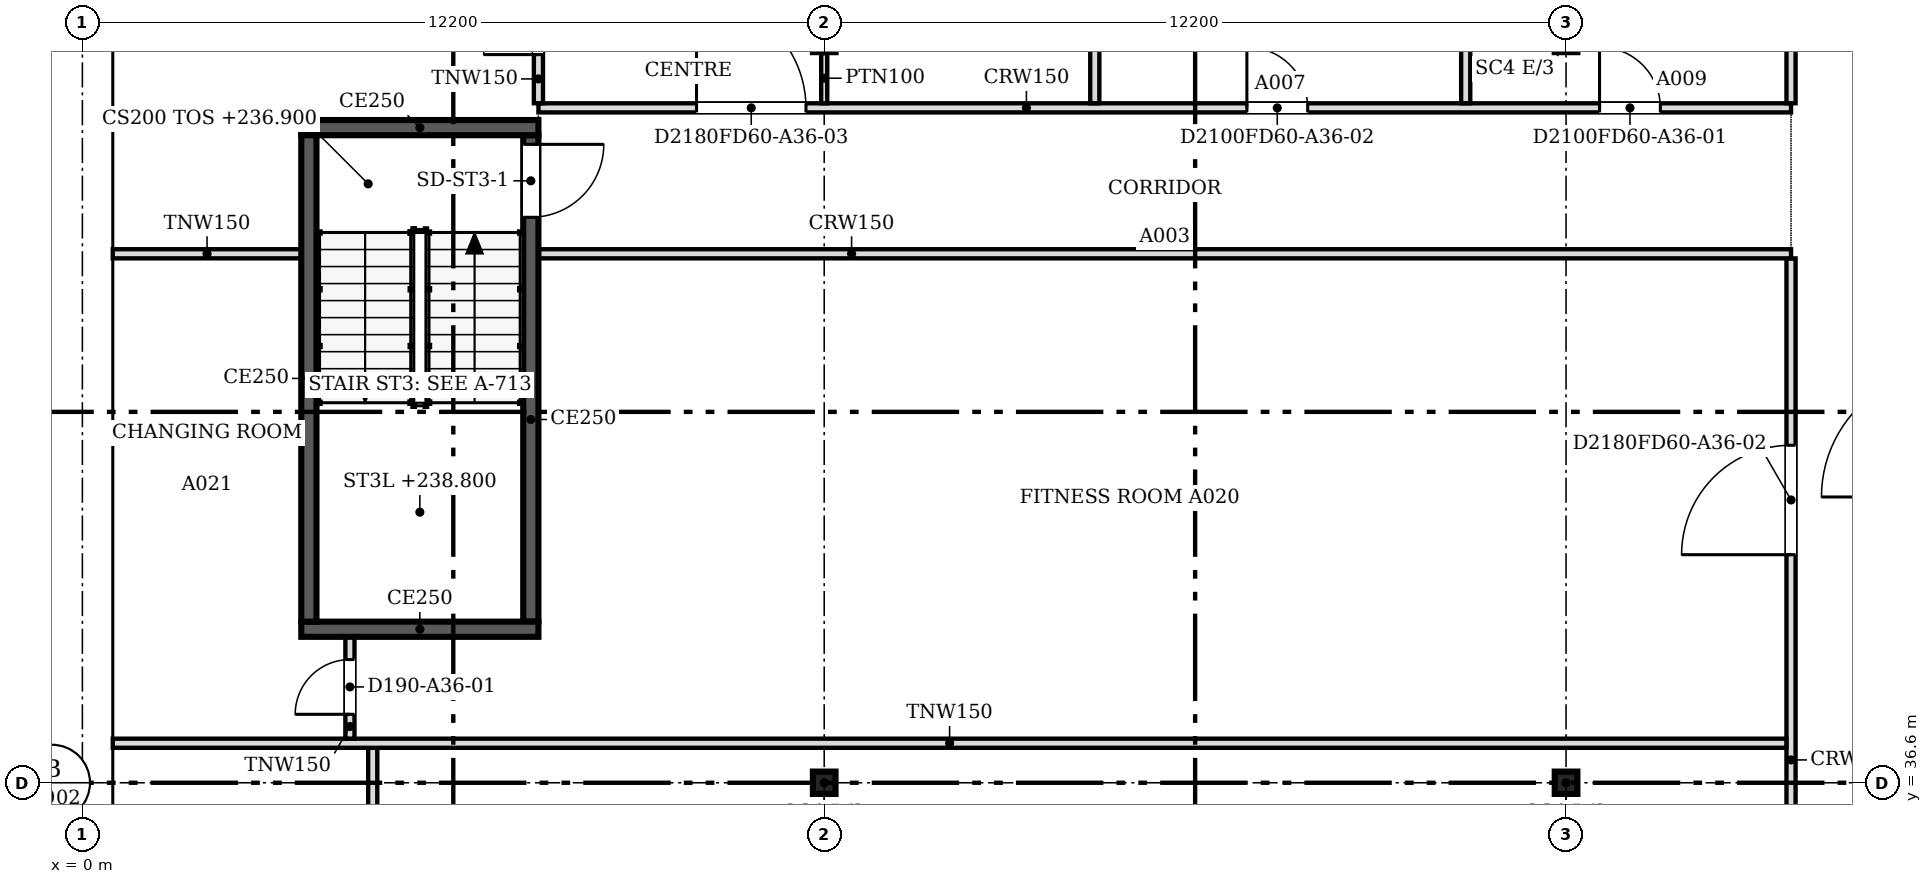
"""IFC4 building model, lengths in metres.
Left out: names, types, materials, properties, quantities, classifications, styles, units other than length and angle.
Written with IfcOpenShell. Run it as: python <this file> out.ifc"""

import sys

from ifc_helpers import new_model, si_unit, direction, frame, frame_2d, origin, origin_2d, place, context, subcontext, project, spatial, polyline, rectangle, i_section, outline, extrude, faceted_brep, source, transform, mapped, element, fill, save


model = new_model("IFC4")
c1 = context("Model", 3, precision=1e-05, world=origin(), true_north=direction((0.0, 1.0)))
c2 = subcontext(c1, "Body", "Model", "MODEL_VIEW")
j1 = project(units=[si_unit("LENGTHUNIT", "METRE"), si_unit("PLANEANGLEUNIT", "RADIAN")], contexts=[c1])
p1 = place(None, origin())
s1 = spatial("IfcSite", under=j1, at=p1, CompositionType="ELEMENT")
p2 = place(p1, origin())
s2 = spatial("IfcBuilding", under=s1, at=p2, CompositionType="ELEMENT")
p3 = place(p2, frame((0.0, 0.0, 236.9)))
s3 = spatial("IfcBuildingStorey", under=s2, at=p3, CompositionType="ELEMENT", Elevation=236.9)
for number, where, z_axis, x_axis in (
    (1, (12.2, 36.6, 0.0), (0.0, 0.0, 1.0), (1.0, 0.0, 0.0)),
    (2, (12.2, 48.8, 0.0), (0.0, 0.0, 1.0), (1.0, 0.0, 0.0)),
    (3, (24.4, 36.6, 0.0), (0.0, 0.0, 1.0), (1.0, 0.0, 0.0)),
    (4, (24.4, 48.8, 0.0), (0.0, 0.0, 1.0), (1.0, 0.0, 0.0)),
):
    element("IfcColumn", number, at=place(p3, frame(where, z_axis=z_axis, x_axis=x_axis)), inside=s3, PredefinedType="COLUMN", context=c2, shape_type="SweptSolid", body=[
        extrude(i_section(OverallWidth=0.373, OverallDepth=0.368, WebThickness=0.015, FlangeThickness=0.024, at=origin_2d()), origin(), (0.0, 0.0, 1.0), 3.6),
    ])
m1 = source(origin(), c2, "Body", "Brep", [
    faceted_brep([(6.053, -0.25, 0.0), (3.003, -0.25, 3.8), (0.0, -0.25, 0.0), (0.047, 0.25, 0.059), (3.003, 0.25, 3.8), (6.053, 0.25, 0.0), (0.047, 0.25, 0.0), (0.0, 0.0, 0.0)], [[[0, 1, 2]], [[3, 4, 5, 6]], [[5, 4, 1, 0]], [[4, 3, 7, 2, 1]], [[6, 5, 0, 2, 7]], [[6, 7, 3]]]),
])
p4 = place(p3, frame((0.25, 48.753, 0.0), z_axis=(0.0, 0.0, 1.0), x_axis=(0.0, -1.0, 0.0)))
e5 = element("IfcWall", 5, at=p4, inside=s3, PredefinedType="SOLIDWALL", context=c2, shape_type="MappedRepresentation", body=[
    mapped(m1, transform((0.0, 0.0, 0.0), scale=1.0)),
])
m2 = source(origin(), c2, "Body", "SweptSolid", [
    extrude(outline(polyline([(5.532, 0.25), (3.005, 3.399), (0.516, 0.25), (5.532, 0.25)])), frame((0.0, 0.26, 0.0), z_axis=(0.0, -1.0, 0.0), x_axis=(1.0, 0.0, 0.0)), (0.0, 0.0, 1.0), 0.52),
])
p5 = place(p4, origin())
e6 = element("IfcOpeningElement", 6, at=p5, cuts=e5, PredefinedType="OPENING", context=c2, shape_type="MappedRepresentation", body=[
    mapped(m2, transform((0.0, 0.0, 0.0), scale=1.0)),
])
m3 = source(origin(), c2, "Body", "Brep", [
    faceted_brep([(6.1, -0.25, 0.0), (3.05, -0.25, 3.8), (0.0, -0.25, 0.0), (6.1, -0.25, 0.0), (0.0, 0.25, 0.0), (3.05, 0.25, 3.8), (6.1, 0.25, 0.0), (6.1, 0.25, 0.0)], [[[0, 1, 2, 3]], [[4, 5, 6, 7]], [[6, 5, 1, 0]], [[5, 4, 2, 1]], [[4, 7, 3, 2]], [[3, 7, 6, 0]]]),
])
p6 = place(p3, frame((0.25, 42.7, 0.0), z_axis=(0.0, 0.0, 1.0), x_axis=(0.0, -1.0, 0.0)))
e7 = element("IfcWall", 7, at=p6, inside=s3, PredefinedType="SOLIDWALL", context=c2, shape_type="MappedRepresentation", body=[
    mapped(m3, transform((0.0, 0.0, 0.0), scale=1.0)),
])
m4 = source(origin(), c2, "Body", "SweptSolid", [
    extrude(outline(polyline([(5.579, 0.25), (3.05, 3.401), (0.521, 0.25), (5.579, 0.25)])), frame((0.0, 0.26, 0.0), z_axis=(0.0, -1.0, 0.0), x_axis=(1.0, 0.0, 0.0)), (0.0, 0.0, 1.0), 0.52),
])
p7 = place(p6, origin())
e8 = element("IfcOpeningElement", 8, at=p7, cuts=e7, PredefinedType="OPENING", context=c2, shape_type="MappedRepresentation", body=[
    mapped(m4, transform((0.0, 0.0, 0.0), scale=1.0)),
])
m5 = source(origin(), c2, "Body", "SweptSolid", [
    extrude(outline(polyline([(6.1, 0.0), (3.05, 3.8), (0.0, 0.0), (6.1, 0.0)])), frame((0.0, 0.25, 0.0), z_axis=(0.0, -1.0, 0.0), x_axis=(1.0, 0.0, 0.0)), (0.0, 0.0, 1.0), 0.5),
])
p8 = place(p3, frame((0.25, 36.6, 0.0), z_axis=(0.0, 0.0, 1.0), x_axis=(0.0, -1.0, 0.0)))
e9 = element("IfcWall", 9, at=p8, inside=s3, PredefinedType="SOLIDWALL", context=c2, shape_type="MappedRepresentation", body=[
    mapped(m5, transform((0.0, 0.0, 0.0), scale=1.0)),
])
p9 = place(p8, origin())
e10 = element("IfcOpeningElement", 10, at=p9, cuts=e9, PredefinedType="OPENING", context=c2, shape_type="MappedRepresentation", body=[
    mapped(m4, transform((0.0, 0.0, 0.0), scale=1.0)),
])
p10 = place(p2, frame((0.0, 0.0, 240.7)))
s4 = spatial("IfcBuildingStorey", under=s2, at=p10, CompositionType="ELEMENT", Elevation=240.7)
m6 = source(origin(), c2, "Body", "Brep", [
    faceted_brep([(0.047, -0.25, 0.0), (3.05, -0.25, 3.8), (0.047, -0.25, 7.6), (0.0, -0.25, 7.54), (0.0, -0.25, 0.06), (0.093, 0.25, 7.541), (3.05, 0.25, 3.8), (0.093, 0.25, 0.059), (0.047, 0.0, 0.0), (0.047, 0.0, 7.6)], [[[0, 1, 2, 3, 4]], [[5, 6, 7]], [[7, 6, 1, 0, 8]], [[6, 5, 9, 2, 1]], [[3, 2, 9]], [[8, 0, 4]], [[7, 8, 4, 3, 9, 5]]]),
])
p11 = place(p10, frame((0.25, 48.8, -3.8), z_axis=(0.0, 0.0, 1.0), x_axis=(0.0, -1.0, 0.0)))
e11 = element("IfcWall", 11, at=p11, inside=s4, PredefinedType="SOLIDWALL", context=c2, shape_type="MappedRepresentation", body=[
    mapped(m6, transform((0.0, 0.0, 0.0), scale=1.0)),
])
m7 = source(origin(), c2, "Body", "SweptSolid", [
    extrude(outline(polyline([(0.247, 0.656), (2.731, 3.8), (0.247, 6.944), (0.247, 0.656)])), frame((0.0, 0.26, 0.0), z_axis=(0.0, -1.0, 0.0), x_axis=(1.0, 0.0, 0.0)), (0.0, 0.0, 1.0), 0.52),
])
p12 = place(p11, origin())
e12 = element("IfcOpeningElement", 12, at=p12, cuts=e11, PredefinedType="OPENING", context=c2, shape_type="MappedRepresentation", body=[
    mapped(m7, transform((0.0, 0.0, 0.0), scale=1.0)),
])
m8 = source(origin(), c2, "Body", "SweptSolid", [
    extrude(outline(polyline([(3.05, 0.0), (6.1, 3.8), (3.05, 7.6), (0.0, 3.8), (3.05, 0.0)])), frame((0.0, 0.25, 0.0), z_axis=(0.0, -1.0, 0.0), x_axis=(1.0, 0.0, 0.0)), (0.0, 0.0, 1.0), 0.5),
])
p13 = place(p10, frame((0.25, 45.75, -3.8), z_axis=(0.0, 0.0, 1.0), x_axis=(0.0, -1.0, 0.0)))
e13 = element("IfcWall", 13, at=p13, inside=s4, PredefinedType="SOLIDWALL", context=c2, shape_type="MappedRepresentation", body=[
    mapped(m8, transform((0.0, 0.0, 0.0), scale=1.0)),
])
m9 = source(origin(), c2, "Body", "SweptSolid", [
    extrude(outline(polyline([(3.05, 0.399), (5.78, 3.8), (3.05, 7.201), (0.321, 3.8), (3.05, 0.399)])), frame((0.0, 0.26, 0.0), z_axis=(0.0, -1.0, 0.0), x_axis=(1.0, 0.0, 0.0)), (0.0, 0.0, 1.0), 0.52),
])
p14 = place(p13, origin())
e14 = element("IfcOpeningElement", 14, at=p14, cuts=e13, PredefinedType="OPENING", context=c2, shape_type="MappedRepresentation", body=[
    mapped(m9, transform((0.0, 0.0, 0.0), scale=1.0)),
])
m10 = source(origin(), c2, "Body", "Brep", [
    faceted_brep([(3.05, -0.25, 0.0), (6.1, -0.25, 3.8), (6.1, -0.25, 3.8), (3.05, -0.25, 7.6), (0.0, -0.25, 3.8), (0.0, 0.25, 3.8), (3.05, 0.25, 7.6), (6.1, 0.25, 3.8), (6.1, 0.25, 3.8), (3.05, 0.25, 0.0)], [[[0, 1, 2, 3, 4]], [[5, 6, 7, 8, 9]], [[9, 8, 1, 0]], [[7, 6, 3, 2]], [[6, 5, 4, 3]], [[5, 9, 0, 4]], [[1, 8, 7, 2]]]),
])
p15 = place(p10, frame((0.25, 39.65, -3.8), z_axis=(0.0, 0.0, 1.0), x_axis=(0.0, -1.0, 0.0)))
e15 = element("IfcWall", 15, at=p15, inside=s4, PredefinedType="SOLIDWALL", context=c2, shape_type="MappedRepresentation", body=[
    mapped(m10, transform((0.0, 0.0, 0.0), scale=1.0)),
])
p16 = place(p15, origin())
e16 = element("IfcOpeningElement", 16, at=p16, cuts=e15, PredefinedType="OPENING", context=c2, shape_type="MappedRepresentation", body=[
    mapped(m9, transform((0.0, 0.0, 0.0), scale=1.0)),
])
p17 = place(p3, frame((7.5, 39.125, 0.0), z_axis=(0.0, 0.0, 1.0), x_axis=(-1.0, 0.0, 0.0)))
e17 = element("IfcWall", 17, at=p17, inside=s3, PredefinedType="SOLIDWALL", context=c2, shape_type="SweptSolid", body=[
    extrude(rectangle(XDim=3.9, YDim=0.25, at=frame_2d((1.95, 0.0))), origin(), (0.0, 0.0, 1.0), 3.8),
])
p18 = place(p3, frame((3.725, 39.25, 0.0), z_axis=(0.0, 0.0, 1.0), x_axis=(0.0, 1.0, 0.0)))
e18 = element("IfcWall", 18, at=p18, inside=s3, PredefinedType="SOLIDWALL", context=c2, shape_type="SweptSolid", body=[
    extrude(rectangle(XDim=8.0, YDim=0.25, at=frame_2d((4.0, 0.0))), origin(), (0.0, 0.0, 1.0), 3.8),
])
p19 = place(p3, frame((3.6, 47.375, 0.0), z_axis=(0.0, 0.0, 1.0), x_axis=(1.0, 0.0, 0.0)))
e19 = element("IfcWall", 19, at=p19, inside=s3, PredefinedType="SOLIDWALL", context=c2, shape_type="SweptSolid", body=[
    extrude(rectangle(XDim=3.9, YDim=0.25, at=frame_2d((1.95, 0.0))), origin(), (0.0, 0.0, 1.0), 3.8),
])
p20 = place(p3, frame((7.375, 47.25, 0.0), z_axis=(0.0, 0.0, 1.0), x_axis=(0.0, -1.0, 0.0)))
e20 = element("IfcWall", 20, at=p20, inside=s3, PredefinedType="SOLIDWALL", context=c2, shape_type="SweptSolid", body=[
    extrude(rectangle(XDim=8.0, YDim=0.25, at=frame_2d((4.0, 0.0))), origin(), (0.0, 0.0, 1.0), 3.8),
])
m11 = source(origin(), c2, "Body", "SweptSolid", [
    extrude(rectangle(XDim=1.2, YDim=2.1, at=frame_2d((0.6, 1.05))), frame((0.0, 0.135, 0.0), z_axis=(0.0, -1.0, 0.0), x_axis=(1.0, 0.0, 0.0)), (0.0, 0.0, 1.0), 0.27),
])
p21 = place(p20, frame((0.15, 0.0, 0.0)))
e21 = element("IfcOpeningElement", 21, at=p21, cuts=e20, PredefinedType="OPENING", context=c2, shape_type="MappedRepresentation", body=[
    mapped(m11, transform((0.0, 0.0, 0.0), scale=1.0)),
])
p22 = place(p3, frame((28.1, 22.076, 0.0), z_axis=(0.0, 0.0, 1.0), x_axis=(0.0, 1.0, 0.0)))
e22 = element("IfcWall", 22, at=p22, inside=s3, PredefinedType="PARTITIONING", context=c2, shape_type="SweptSolid", body=[
    extrude(rectangle(XDim=23.148, YDim=0.15, at=frame_2d((11.574, 0.0))), origin(), (0.0, 0.0, 1.0), 3.067),
])
m12 = source(origin(), c2, "Body", "SweptSolid", [
    extrude(rectangle(XDim=1.8, YDim=2.1, at=frame_2d((0.9, 1.05))), frame((0.0, 0.085, 0.0), z_axis=(0.0, -1.0, 0.0), x_axis=(1.0, 0.0, 0.0)), (0.0, 0.0, 1.0), 0.17),
])
p23 = place(p22, frame((2.1, 0.0, 0.0)))
e23 = element("IfcOpeningElement", 23, at=p23, cuts=e22, PredefinedType="OPENING", context=c2, shape_type="MappedRepresentation", body=[
    mapped(m12, transform((0.0, 0.0, 0.0), scale=1.0)),
])
p24 = place(p22, frame((18.275, 0.0, 0.0)))
e24 = element("IfcOpeningElement", 24, at=p24, cuts=e22, PredefinedType="OPENING", context=c2, shape_type="MappedRepresentation", body=[
    mapped(m12, transform((0.0, 0.0, 0.0), scale=1.0)),
])
p25 = place(p22, frame((9.724, 0.0, 0.0)))
e25 = element("IfcOpeningElement", 25, at=p25, cuts=e22, PredefinedType="OPENING", context=c2, shape_type="MappedRepresentation", body=[
    mapped(m12, transform((0.0, 0.0, 0.0), scale=1.0)),
])
p26 = place(p3, frame((4.775, 28.1, 0.0), z_axis=(0.0, 0.0, 1.0), x_axis=(0.0, 1.0, 0.0)))
e26 = element("IfcWall", 26, at=p26, inside=s3, PredefinedType="PARTITIONING", context=c2, shape_type="SweptSolid", body=[
    extrude(rectangle(XDim=9.074, YDim=0.15, at=frame_2d((4.537, 0.0))), origin(), (0.0, 0.0, 1.0), 3.067),
])
m13 = source(origin(), c2, "Body", "SweptSolid", [
    extrude(rectangle(XDim=0.9, YDim=2.1, at=frame_2d((0.45, 1.05))), frame((0.0, 0.085, 0.0), z_axis=(0.0, -1.0, 0.0), x_axis=(1.0, 0.0, 0.0)), (0.0, 0.0, 1.0), 0.17),
])
p27 = place(p26, frame((1.8, 0.0, 0.0)))
e27 = element("IfcOpeningElement", 27, at=p27, cuts=e26, PredefinedType="OPENING", context=c2, shape_type="MappedRepresentation", body=[
    mapped(m13, transform((0.0, 0.0, 0.0), scale=1.0)),
])
p28 = place(p26, frame((6.32, 0.0, 0.0)))
e28 = element("IfcOpeningElement", 28, at=p28, cuts=e26, PredefinedType="OPENING", context=c2, shape_type="MappedRepresentation", body=[
    mapped(m13, transform((0.0, 0.0, 0.0), scale=1.0)),
])
p29 = place(p3, frame((0.5, 37.25, 0.0), z_axis=(0.0, 0.0, 1.0), x_axis=(1.0, 0.0, 0.0)))
e29 = element("IfcWall", 29, at=p29, inside=s3, PredefinedType="PARTITIONING", context=c2, shape_type="SweptSolid", body=[
    extrude(rectangle(XDim=27.524, YDim=0.15, at=frame_2d((13.762, 0.0))), origin(), (0.0, 0.0, 1.0), 3.067),
])
p30 = place(p3, frame((4.4, 37.326, 0.0), z_axis=(0.0, 0.0, 1.0), x_axis=(0.0, 1.0, 0.0)))
e30 = element("IfcWall", 30, at=p30, inside=s3, PredefinedType="PARTITIONING", context=c2, shape_type="SweptSolid", body=[
    extrude(rectangle(XDim=1.674, YDim=0.15, at=frame_2d((0.837, 0.0))), origin(), (0.0, 0.0, 1.0), 3.067),
])
p31 = place(p30, frame((0.4, 0.0, 0.0)))
e31 = element("IfcOpeningElement", 31, at=p31, cuts=e30, PredefinedType="OPENING", context=c2, shape_type="MappedRepresentation", body=[
    mapped(m13, transform((0.0, 0.0, 0.0), scale=1.0)),
])
p32 = place(p3, frame((0.5, 45.3, 0.0), z_axis=(0.0, 0.0, 1.0), x_axis=(1.0, 0.0, 0.0)))
e32 = element("IfcWall", 32, at=p32, inside=s3, PredefinedType="PARTITIONING", context=c2, shape_type="SweptSolid", body=[
    extrude(rectangle(XDim=3.1, YDim=0.15, at=frame_2d((1.55, 0.0))), origin(), (0.0, 0.0, 1.0), 3.067),
])
p33 = place(p3, frame((7.5, 45.3, 0.0), z_axis=(0.0, 0.0, 1.0), x_axis=(1.0, 0.0, 0.0)))
e33 = element("IfcWall", 33, at=p33, inside=s3, PredefinedType="PARTITIONING", context=c2, shape_type="SweptSolid", body=[
    extrude(rectangle(XDim=20.6, YDim=0.15, at=frame_2d((10.3, 0.0))), origin(), (0.0, 0.0, 1.0), 3.067),
])
p34 = place(p3, frame((7.5, 47.7, 0.0), z_axis=(0.0, 0.0, 1.0), x_axis=(1.0, 0.0, 0.0)))
e34 = element("IfcWall", 34, at=p34, inside=s3, PredefinedType="PARTITIONING", context=c2, shape_type="SweptSolid", body=[
    extrude(rectangle(XDim=20.6, YDim=0.15, at=frame_2d((10.3, 0.0))), origin(), (0.0, 0.0, 1.0), 3.067),
])
m14 = source(origin(), c2, "Body", "SweptSolid", [
    extrude(rectangle(XDim=1.0, YDim=2.1, at=frame_2d((0.5, 1.05))), frame((0.0, 0.085, 0.0), z_axis=(0.0, -1.0, 0.0), x_axis=(1.0, 0.0, 0.0)), (0.0, 0.0, 1.0), 0.17),
])
p35 = place(p34, frame((17.451, 0.0, 0.0)))
e35 = element("IfcOpeningElement", 35, at=p35, cuts=e34, PredefinedType="OPENING", context=c2, shape_type="MappedRepresentation", body=[
    mapped(m14, transform((0.0, 0.0, 0.0), scale=1.0)),
])
p36 = place(p34, frame((11.651, 0.0, 0.0)))
e36 = element("IfcOpeningElement", 36, at=p36, cuts=e34, PredefinedType="OPENING", context=c2, shape_type="MappedRepresentation", body=[
    mapped(m14, transform((0.0, 0.0, 0.0), scale=1.0)),
])
p37 = place(p34, frame((2.6, 0.0, 0.0)))
e37 = element("IfcOpeningElement", 37, at=p37, cuts=e34, PredefinedType="OPENING", context=c2, shape_type="MappedRepresentation", body=[
    mapped(m12, transform((0.0, 0.0, 0.0), scale=1.0)),
])
p38 = place(p3, frame((7.5, 47.776, 0.0), z_axis=(0.0, 0.0, 1.0), x_axis=(0.0, 1.0, 0.0)))
e38 = element("IfcWall", 38, at=p38, inside=s3, PredefinedType="PARTITIONING", context=c2, shape_type="SweptSolid", body=[
    extrude(rectangle(XDim=2.498, YDim=0.15, at=frame_2d((1.249, 0.0))), origin(), (0.0, 0.0, 1.0), 3.067),
])
p39 = place(p38, frame((0.8, 0.0, 0.0)))
e39 = element("IfcOpeningElement", 39, at=p39, cuts=e38, PredefinedType="OPENING", context=c2, shape_type="MappedRepresentation", body=[
    mapped(m13, transform((0.0, 0.0, 0.0), scale=1.0)),
])
p40 = place(p3, frame((16.65, 47.776, 0.0), z_axis=(0.0, 0.0, 1.0), x_axis=(0.0, 1.0, 0.0)))
e40 = element("IfcWall", 40, at=p40, inside=s3, PredefinedType="PARTITIONING", context=c2, shape_type="SweptSolid", body=[
    extrude(rectangle(XDim=2.498, YDim=0.15, at=frame_2d((1.249, 0.0))), origin(), (0.0, 0.0, 1.0), 3.067),
])
p41 = place(p3, frame((22.75, 47.776, 0.0), z_axis=(0.0, 0.0, 1.0), x_axis=(0.0, 1.0, 0.0)))
e41 = element("IfcWall", 41, at=p41, inside=s3, PredefinedType="PARTITIONING", context=c2, shape_type="SweptSolid", body=[
    extrude(rectangle(XDim=2.948, YDim=0.15, at=frame_2d((1.474, 0.0))), origin(), (0.0, 0.0, 1.0), 3.067),
])
p42 = place(p3, frame((28.1, 47.776, 0.0), z_axis=(0.0, 0.0, 1.0), x_axis=(0.0, 1.0, 0.0)))
e42 = element("IfcWall", 42, at=p42, inside=s3, PredefinedType="PARTITIONING", context=c2, shape_type="SweptSolid", body=[
    extrude(rectangle(XDim=3.174, YDim=0.15, at=frame_2d((1.587, 0.0))), origin(), (0.0, 0.0, 1.0), 3.067),
])
p43 = place(p3, frame((12.2, 48.6, 0.0), z_axis=(0.0, 0.0, 1.0), x_axis=(0.0, -1.0, 0.0)))
e43 = element("IfcWall", 43, at=p43, inside=s3, PredefinedType="PARTITIONING", context=c2, shape_type="SweptSolid", body=[
    extrude(rectangle(XDim=0.825, YDim=0.1, at=frame_2d((0.413, 0.0))), origin(), (0.0, 0.0, 1.0), 3.067),
])
m15 = source(origin(), c2, "Body", "SweptSolid", [
    extrude(rectangle(XDim=1.2, YDim=2.1, at=frame_2d((0.6, 1.05))), frame((0.0, 0.025, 0.0), z_axis=(0.0, -1.0, 0.0), x_axis=(1.0, 0.0, 0.0)), (0.0, 0.0, 1.0), 0.05),
])
p44 = place(p21, origin())
e44 = element("IfcDoor", 44, at=p44, inside=s3, OperationType="SINGLE_SWING_LEFT", PredefinedType="DOOR", context=c2, shape_type="MappedRepresentation", body=[
    mapped(m15, transform((0.0, 0.0, 0.0), scale=1.0)),
])
fill(e21, e44)
m16 = source(origin(), c2, "Body", "SweptSolid", [
    extrude(rectangle(XDim=0.9, YDim=2.1, at=frame_2d((0.45, 1.05))), frame((0.0, 0.025, 0.0), z_axis=(0.0, -1.0, 0.0), x_axis=(1.0, 0.0, 0.0)), (0.0, 0.0, 1.0), 0.05),
])
p45 = place(p31, origin())
e45 = element("IfcDoor", 45, at=p45, inside=s3, OperationType="SINGLE_SWING_LEFT", PredefinedType="DOOR", context=c2, shape_type="MappedRepresentation", body=[
    mapped(m16, transform((0.0, 0.0, 0.0), scale=1.0)),
])
fill(e31, e45)
m17 = source(origin(), c2, "Body", "SweptSolid", [
    extrude(rectangle(XDim=1.0, YDim=2.1, at=frame_2d((0.5, 1.05))), frame((0.0, 0.025, 0.0), z_axis=(0.0, -1.0, 0.0), x_axis=(1.0, 0.0, 0.0)), (0.0, 0.0, 1.0), 0.05),
])
p46 = place(p35, origin())
e46 = element("IfcDoor", 46, at=p46, inside=s3, OperationType="SINGLE_SWING_LEFT", PredefinedType="DOOR", context=c2, shape_type="MappedRepresentation", body=[
    mapped(m17, transform((0.0, 0.0, 0.0), scale=1.0)),
])
fill(e35, e46)
p47 = place(p36, origin())
e47 = element("IfcDoor", 47, at=p47, inside=s3, OperationType="SINGLE_SWING_LEFT", PredefinedType="DOOR", context=c2, shape_type="MappedRepresentation", body=[
    mapped(m17, transform((0.0, 0.0, 0.0), scale=1.0)),
])
fill(e36, e47)
p48 = place(p39, origin())
e48 = element("IfcDoor", 48, at=p48, inside=s3, OperationType="SINGLE_SWING_LEFT", PredefinedType="DOOR", context=c2, shape_type="MappedRepresentation", body=[
    mapped(m16, transform((0.0, 0.0, 0.0), scale=1.0)),
])
fill(e39, e48)
m18 = source(origin(), c2, "Body", "SweptSolid", [
    extrude(rectangle(XDim=1.8, YDim=2.1, at=frame_2d((0.9, 1.05))), frame((0.0, 0.025, 0.0), z_axis=(0.0, -1.0, 0.0), x_axis=(1.0, 0.0, 0.0)), (0.0, 0.0, 1.0), 0.05),
])
p49 = place(p24, origin())
e49 = element("IfcDoor", 49, at=p49, inside=s3, OperationType="DOUBLE_DOOR_SINGLE_SWING", PredefinedType="DOOR", context=c2, shape_type="MappedRepresentation", body=[
    mapped(m18, transform((0.0, 0.0, 0.0), scale=1.0)),
])
fill(e24, e49)
p50 = place(p37, origin())
e50 = element("IfcDoor", 50, at=p50, inside=s3, OperationType="DOUBLE_DOOR_SINGLE_SWING", PredefinedType="DOOR", context=c2, shape_type="MappedRepresentation", body=[
    mapped(m18, transform((0.0, 0.0, 0.0), scale=1.0)),
])
fill(e37, e50)
save(model, sys.argv[1])
